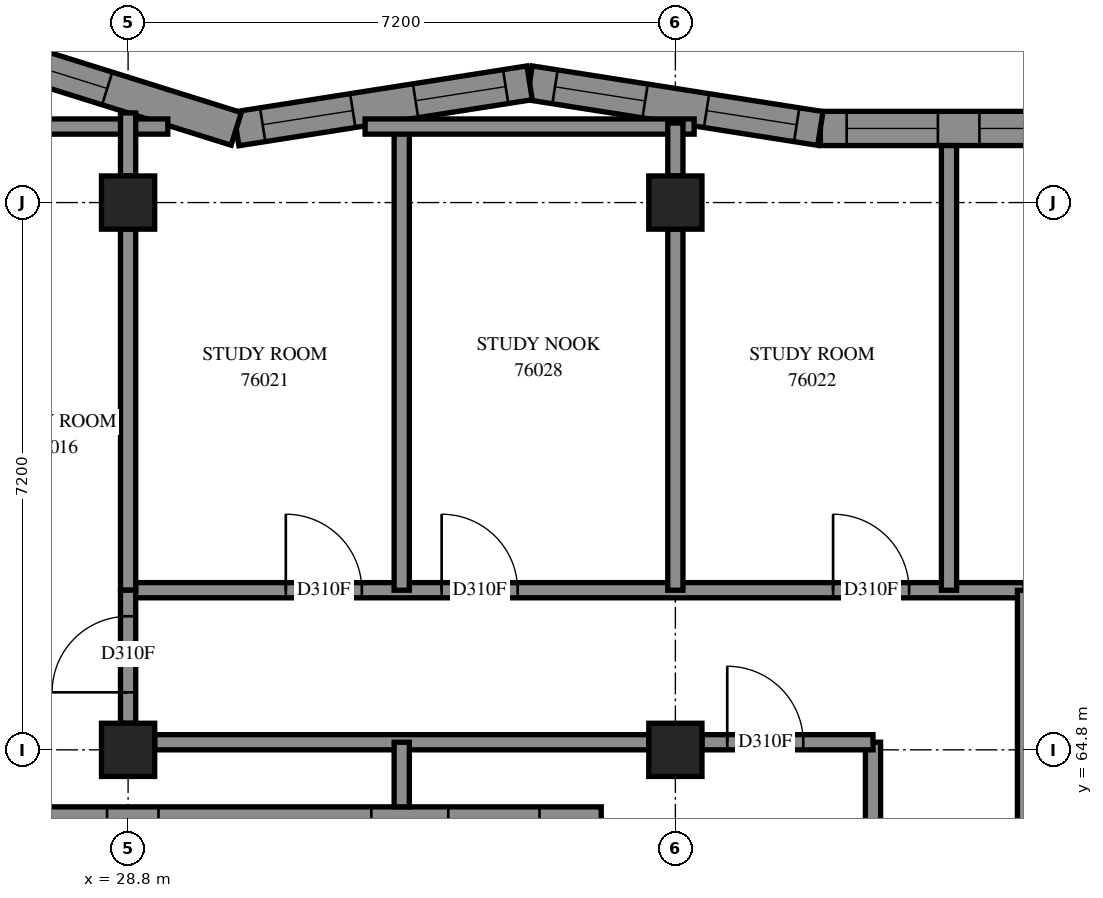
"""IFC4 building model, lengths in metres.
Left out: names, types, materials, properties, quantities, classifications, styles, units other than length and angle.
Written with IfcOpenShell. Run it as: python <this file> out.ifc"""

import sys

from ifc_helpers import new_model, si_unit, direction, frame, frame_2d, origin, origin_2d, place, context, subcontext, project, spatial, polyline, rectangle, outline, extrude, element, fill, save


model = new_model("IFC4")
c1 = context("Model", 3, precision=1e-05, world=origin(), true_north=direction((0.0, 1.0)))
c2 = subcontext(c1, "Body", "Model", "MODEL_VIEW")
j1 = project(units=[si_unit("LENGTHUNIT", "METRE"), si_unit("PLANEANGLEUNIT", "RADIAN")], contexts=[c1])
p1 = place(None, origin())
s1 = spatial("IfcSite", under=j1, at=p1, CompositionType="ELEMENT")
p2 = place(p1, origin())
s2 = spatial("IfcBuilding", under=s1, at=p2, CompositionType="ELEMENT")
p3 = place(p2, frame((0.0, 0.0, 277.8)))
s3 = spatial("IfcBuildingStorey", under=s2, at=p3, CompositionType="ELEMENT", Elevation=277.8)
for number, where, z_axis, x_axis in (
    (1, (28.8, 64.8, 0.0), (0.0, 0.0, 1.0), (1.0, 0.0, 0.0)),
    (2, (28.8, 72.0, 0.0), (0.0, 0.0, 1.0), (1.0, 0.0, 0.0)),
    (3, (36.0, 64.8, 0.0), (0.0, 0.0, 1.0), (1.0, 0.0, 0.0)),
    (4, (36.0, 72.0, 0.0), (0.0, 0.0, 1.0), (1.0, 0.0, 0.0)),
):
    element("IfcColumn", number, at=place(p3, frame(where, z_axis=z_axis, x_axis=x_axis)), inside=s3, PredefinedType="COLUMN", context=c2, shape_type="SweptSolid", body=[
        extrude(rectangle(XDim=0.7, YDim=0.7, at=origin_2d()), origin(), (0.0, 0.0, 1.0), 3.1),
    ])
p4 = place(p3, frame((45.611, 72.975, 0.0), z_axis=(0.0, 0.0, 1.0), x_axis=(-1.0, 0.0, 0.0)))
e5 = element("IfcWall", 5, at=p4, inside=s3, PredefinedType="SOLIDWALL", context=c2, shape_type="SweptSolid", body=[
    extrude(outline(polyline([(0.0, -0.225), (7.686, -0.225), (7.721, 0.225), (0.0, 0.225), (0.0, -0.225)])), origin(), (0.0, 0.0, 1.0), 3.1),
])
p5 = place(p4, frame((2.811, 0.0, 0.45)))
e6 = element("IfcOpeningElement", 6, at=p5, cuts=e5, PredefinedType="OPENING", context=c2, shape_type="SweptSolid", body=[
    extrude(rectangle(XDim=2.8, YDim=2.55, at=frame_2d((1.4, 1.275))), frame((0.0, 0.235, 0.0), z_axis=(0.0, -1.0, 0.0), x_axis=(1.0, 0.0, 0.0)), (0.0, 0.0, 1.0), 0.47),
])
p6 = place(p4, frame((0.705, 0.0, 0.45)))
e7 = element("IfcOpeningElement", 7, at=p6, cuts=e5, PredefinedType="OPENING", context=c2, shape_type="SweptSolid", body=[
    extrude(rectangle(XDim=1.2, YDim=2.55, at=frame_2d((0.6, 1.275))), frame((0.0, 0.235, 0.0), z_axis=(0.0, -1.0, 0.0), x_axis=(1.0, 0.0, 0.0)), (0.0, 0.0, 1.0), 0.47),
])
p7 = place(p4, frame((6.157, 0.0, 0.45)))
e8 = element("IfcOpeningElement", 8, at=p7, cuts=e5, PredefinedType="OPENING", context=c2, shape_type="SweptSolid", body=[
    extrude(rectangle(XDim=1.2, YDim=2.55, at=frame_2d((0.6, 1.275))), frame((0.0, 0.235, 0.0), z_axis=(0.0, -1.0, 0.0), x_axis=(1.0, 0.0, 0.0)), (0.0, 0.0, 1.0), 0.47),
])
p8 = place(p3, frame((37.908, 72.975, 0.0), z_axis=(0.0, 0.0, 1.0), x_axis=(-0.9879128581, 0.1550102733, 0.0)))
e9 = element("IfcWall", 9, at=p8, inside=s3, PredefinedType="SOLIDWALL", context=c2, shape_type="SweptSolid", body=[
    extrude(outline(polyline([(0.018, -0.225), (3.907, -0.225), (3.837, 0.225), (-0.018, 0.225), (0.018, -0.225)])), origin(), (0.0, 0.0, 1.0), 3.1),
])
p9 = place(p8, frame((0.316, 0.0, 0.45)))
e10 = element("IfcOpeningElement", 10, at=p9, cuts=e9, PredefinedType="OPENING", context=c2, shape_type="SweptSolid", body=[
    extrude(rectangle(XDim=1.2, YDim=2.55, at=frame_2d((0.6, 1.275))), frame((0.0, 0.235, 0.0), z_axis=(0.0, -1.0, 0.0), x_axis=(1.0, 0.0, 0.0)), (0.0, 0.0, 1.0), 0.47),
])
p10 = place(p8, frame((2.334, 0.0, 0.45)))
e11 = element("IfcOpeningElement", 11, at=p10, cuts=e9, PredefinedType="OPENING", context=c2, shape_type="SweptSolid", body=[
    extrude(rectangle(XDim=1.2, YDim=2.55, at=frame_2d((0.6, 1.275))), frame((0.0, 0.235, 0.0), z_axis=(0.0, -1.0, 0.0), x_axis=(1.0, 0.0, 0.0)), (0.0, 0.0, 1.0), 0.47),
])
p11 = place(p3, frame((34.083, 73.575, 0.0), z_axis=(0.0, 0.0, 1.0), x_axis=(-0.9879139938, -0.155003035, 0.0)))
e12 = element("IfcWall", 12, at=p11, inside=s3, PredefinedType="SOLIDWALL", context=c2, shape_type="SweptSolid", body=[
    extrude(outline(polyline([(-0.035, -0.225), (3.854, -0.225), (3.96, 0.225), (0.035, 0.225), (-0.035, -0.225)])), origin(), (0.0, 0.0, 1.0), 3.1),
])
p12 = place(p11, frame((0.319, 0.0, 0.45)))
e13 = element("IfcOpeningElement", 13, at=p12, cuts=e12, PredefinedType="OPENING", context=c2, shape_type="SweptSolid", body=[
    extrude(rectangle(XDim=1.2, YDim=2.55, at=frame_2d((0.6, 1.275))), frame((0.0, 0.235, 0.0), z_axis=(0.0, -1.0, 0.0), x_axis=(1.0, 0.0, 0.0)), (0.0, 0.0, 1.0), 0.47),
])
p13 = place(p11, frame((2.355, 0.0, 0.45)))
e14 = element("IfcOpeningElement", 14, at=p13, cuts=e12, PredefinedType="OPENING", context=c2, shape_type="SweptSolid", body=[
    extrude(rectangle(XDim=1.2, YDim=2.55, at=frame_2d((0.6, 1.275))), frame((0.0, 0.235, 0.0), z_axis=(0.0, -1.0, 0.0), x_axis=(1.0, 0.0, 0.0)), (0.0, 0.0, 1.0), 0.47),
])
p14 = place(p3, frame((30.223, 72.97, 0.0), z_axis=(0.0, 0.0, 1.0), x_axis=(-0.9543303604, 0.2987533486, 0.0)))
e15 = element("IfcWall", 15, at=p14, inside=s3, PredefinedType="SOLIDWALL", context=c2, shape_type="SweptSolid", body=[
    extrude(outline(polyline([(0.053, -0.225), (4.079, -0.225), (3.467, 0.225), (-0.053, 0.225), (0.053, -0.225)])), origin(), (0.0, 0.0, 1.0), 3.1),
])
p15 = place(p14, frame((1.779, 0.0, 0.45)))
e16 = element("IfcOpeningElement", 16, at=p15, cuts=e15, PredefinedType="OPENING", context=c2, shape_type="SweptSolid", body=[
    extrude(rectangle(XDim=1.2, YDim=2.55, at=frame_2d((0.6, 1.275))), frame((0.0, 0.235, 0.0), z_axis=(0.0, -1.0, 0.0), x_axis=(1.0, 0.0, 0.0)), (0.0, 0.0, 1.0), 0.47),
])
p16 = place(p3, frame((26.622, 63.825, 0.0), z_axis=(0.0, 0.0, 1.0), x_axis=(1.0, 0.0, 0.0)))
e17 = element("IfcWall", 17, at=p16, inside=s3, PredefinedType="SOLIDWALL", context=c2, shape_type="SweptSolid", body=[
    extrude(outline(polyline([(-0.225, -0.225), (8.178, -0.225), (8.628, 0.225), (0.225, 0.225), (-0.225, -0.225)])), origin(), (0.0, 0.0, 1.0), 3.1),
])
p17 = place(p16, frame((2.578, 0.0, 0.45)))
e18 = element("IfcOpeningElement", 18, at=p17, cuts=e17, PredefinedType="OPENING", context=c2, shape_type="SweptSolid", body=[
    extrude(rectangle(XDim=2.8, YDim=2.55, at=frame_2d((1.4, 1.275))), frame((0.0, 0.235, 0.0), z_axis=(0.0, -1.0, 0.0), x_axis=(1.0, 0.0, 0.0)), (0.0, 0.0, 1.0), 0.47),
])
p18 = place(p16, frame((0.702, 0.0, 0.45)))
e19 = element("IfcOpeningElement", 19, at=p18, cuts=e17, PredefinedType="OPENING", context=c2, shape_type="SweptSolid", body=[
    extrude(rectangle(XDim=1.2, YDim=2.55, at=frame_2d((0.6, 1.275))), frame((0.0, 0.235, 0.0), z_axis=(0.0, -1.0, 0.0), x_axis=(1.0, 0.0, 0.0)), (0.0, 0.0, 1.0), 0.47),
])
p19 = place(p16, frame((6.391, 0.0, 0.45)))
e20 = element("IfcOpeningElement", 20, at=p19, cuts=e17, PredefinedType="OPENING", context=c2, shape_type="SweptSolid", body=[
    extrude(rectangle(XDim=1.2, YDim=2.55, at=frame_2d((0.6, 1.275))), frame((0.0, 0.235, 0.0), z_axis=(0.0, -1.0, 0.0), x_axis=(1.0, 0.0, 0.0)), (0.0, 0.0, 1.0), 0.47),
])
p20 = place(p3, frame((35.025, 63.825, 0.0), z_axis=(0.0, 0.0, 1.0), x_axis=(0.0, -1.0, 0.0)))
e21 = element("IfcWall", 21, at=p20, inside=s3, PredefinedType="SOLIDWALL", context=c2, shape_type="SweptSolid", body=[
    extrude(outline(polyline([(0.225, -0.225), (7.425, -0.225), (6.975, 0.225), (-0.225, 0.225), (0.225, -0.225)])), origin(), (0.0, 0.0, 1.0), 3.1),
])
p21 = place(p20, frame((0.312, 0.0, 0.45)))
e22 = element("IfcOpeningElement", 22, at=p21, cuts=e21, PredefinedType="OPENING", context=c2, shape_type="SweptSolid", body=[
    extrude(rectangle(XDim=1.2, YDim=2.55, at=frame_2d((0.6, 1.275))), frame((0.0, 0.235, 0.0), z_axis=(0.0, -1.0, 0.0), x_axis=(1.0, 0.0, 0.0)), (0.0, 0.0, 1.0), 0.47),
])
p22 = place(p20, frame((3.875, 0.0, 0.7)))
e23 = element("IfcOpeningElement", 23, at=p22, cuts=e21, PredefinedType="OPENING", context=c2, shape_type="SweptSolid", body=[
    extrude(rectangle(XDim=1.8, YDim=2.3, at=frame_2d((0.9, 1.15))), frame((0.0, 0.235, 0.0), z_axis=(0.0, -1.0, 0.0), x_axis=(1.0, 0.0, 0.0)), (0.0, 0.0, 1.0), 0.47),
])
p23 = place(p3, frame((28.8, 66.9, 0.0), z_axis=(0.0, 0.0, 1.0), x_axis=(1.0, 0.0, 0.0)))
e24 = element("IfcWall", 24, at=p23, inside=s3, PredefinedType="PARTITIONING", context=c2, shape_type="SweptSolid", body=[
    extrude(rectangle(XDim=11.8, YDim=0.2, at=frame_2d((5.9, 0.0))), origin(), (0.0, 0.0, 1.0), 3.1),
])
p24 = place(p23, frame((2.075, 0.0, 0.0)))
e25 = element("IfcOpeningElement", 25, at=p24, cuts=e24, PredefinedType="OPENING", context=c2, shape_type="SweptSolid", body=[
    extrude(rectangle(XDim=1.0, YDim=2.1, at=frame_2d((0.5, 1.05))), frame((0.0, 0.11, 0.0), z_axis=(0.0, -1.0, 0.0), x_axis=(1.0, 0.0, 0.0)), (0.0, 0.0, 1.0), 0.22),
])
p25 = place(p23, frame((9.275, 0.0, 0.0)))
e26 = element("IfcOpeningElement", 26, at=p25, cuts=e24, PredefinedType="OPENING", context=c2, shape_type="SweptSolid", body=[
    extrude(rectangle(XDim=1.0, YDim=2.1, at=frame_2d((0.5, 1.05))), frame((0.0, 0.11, 0.0), z_axis=(0.0, -1.0, 0.0), x_axis=(1.0, 0.0, 0.0)), (0.0, 0.0, 1.0), 0.22),
])
p26 = place(p23, frame((4.125, 0.0, 0.0)))
e27 = element("IfcOpeningElement", 27, at=p26, cuts=e24, PredefinedType="OPENING", context=c2, shape_type="SweptSolid", body=[
    extrude(rectangle(XDim=1.0, YDim=2.1, at=frame_2d((0.5, 1.05))), frame((0.0, 0.11, 0.0), z_axis=(0.0, -1.0, 0.0), x_axis=(1.0, 0.0, 0.0)), (0.0, 0.0, 1.0), 0.22),
])
p27 = place(p3, frame((29.15, 64.9, 0.0), z_axis=(0.0, 0.0, 1.0), x_axis=(1.0, 0.0, 0.0)))
e28 = element("IfcWall", 28, at=p27, inside=s3, PredefinedType="PARTITIONING", context=c2, shape_type="SweptSolid", body=[
    extrude(rectangle(XDim=6.5, YDim=0.2, at=frame_2d((3.25, 0.0))), origin(), (0.0, 0.0, 1.0), 2.6),
])
p28 = place(p3, frame((32.4, 66.9, 0.0), z_axis=(0.0, 0.0, 1.0), x_axis=(0.0, 1.0, 0.0)))
e29 = element("IfcWall", 29, at=p28, inside=s3, PredefinedType="PARTITIONING", context=c2, shape_type="SweptSolid", body=[
    extrude(rectangle(XDim=6.184, YDim=0.2, at=frame_2d((3.092, 0.0))), origin(), (0.0, 0.0, 1.0), 3.1),
])
p29 = place(p3, frame((39.6, 66.9, 0.0), z_axis=(0.0, 0.0, 1.0), x_axis=(0.0, 1.0, 0.0)))
e30 = element("IfcWall", 30, at=p29, inside=s3, PredefinedType="PARTITIONING", context=c2, shape_type="SweptSolid", body=[
    extrude(rectangle(XDim=5.85, YDim=0.2, at=frame_2d((2.925, 0.0))), origin(), (0.0, 0.0, 1.0), 3.1),
])
p30 = place(p3, frame((28.8, 66.9, 0.0), z_axis=(0.0, 0.0, 1.0), x_axis=(0.0, 1.0, 0.0)))
e31 = element("IfcWall", 31, at=p30, inside=s3, PredefinedType="PARTITIONING", context=c2, shape_type="SweptSolid", body=[
    extrude(rectangle(XDim=4.75, YDim=0.2, at=frame_2d((2.375, 0.0))), origin(), (0.0, 0.0, 1.0), 2.6),
])
p31 = place(p3, frame((36.0, 66.9, 0.0), z_axis=(0.0, 0.0, 1.0), x_axis=(0.0, 1.0, 0.0)))
e32 = element("IfcWall", 32, at=p31, inside=s3, PredefinedType="PARTITIONING", context=c2, shape_type="SweptSolid", body=[
    extrude(rectangle(XDim=4.75, YDim=0.2, at=frame_2d((2.375, 0.0))), origin(), (0.0, 0.0, 1.0), 3.1),
])
p32 = place(p3, frame((40.6, 62.202, 0.0), z_axis=(0.0, 0.0, 1.0), x_axis=(0.0, 1.0, 0.0)))
e33 = element("IfcWall", 33, at=p32, inside=s3, PredefinedType="PARTITIONING", context=c2, shape_type="SweptSolid", body=[
    extrude(rectangle(XDim=4.696, YDim=0.2, at=frame_2d((2.348, 0.0))), origin(), (0.0, 0.0, 1.0), 3.1),
])
p33 = place(p3, frame((31.918, 73.0, 0.0), z_axis=(0.0, 0.0, 1.0), x_axis=(1.0, 0.0, 0.0)))
e34 = element("IfcWall", 34, at=p33, inside=s3, PredefinedType="PARTITIONING", context=c2, shape_type="SweptSolid", body=[
    extrude(rectangle(XDim=4.329, YDim=0.2, at=frame_2d((2.164, 0.0))), origin(), (0.0, 0.0, 1.0), 3.1),
])
p34 = place(p3, frame((38.6, 62.202, 0.0), z_axis=(0.0, 0.0, 1.0), x_axis=(0.0, 1.0, 0.0)))
e35 = element("IfcWall", 35, at=p34, inside=s3, PredefinedType="PARTITIONING", context=c2, shape_type="SweptSolid", body=[
    extrude(rectangle(XDim=2.698, YDim=0.2, at=frame_2d((1.349, 0.0))), origin(), (0.0, 0.0, 1.0), 3.1),
])
p35 = place(p3, frame((26.847, 73.0, 0.0), z_axis=(0.0, 0.0, 1.0), x_axis=(1.0, 0.0, 0.0)))
e36 = element("IfcWall", 36, at=p35, inside=s3, PredefinedType="PARTITIONING", context=c2, shape_type="SweptSolid", body=[
    extrude(rectangle(XDim=2.475, YDim=0.2, at=frame_2d((1.238, 0.0))), origin(), (0.0, 0.0, 1.0), 3.1),
])
p36 = place(p3, frame((36.35, 64.9, 0.0), z_axis=(0.0, 0.0, 1.0), x_axis=(1.0, 0.0, 0.0)))
e37 = element("IfcWall", 37, at=p36, inside=s3, PredefinedType="PARTITIONING", context=c2, shape_type="SweptSolid", body=[
    extrude(rectangle(XDim=2.25, YDim=0.2, at=frame_2d((1.125, 0.0))), origin(), (0.0, 0.0, 1.0), 3.1),
])
p37 = place(p36, frame((0.333, 0.0, 0.0)))
e38 = element("IfcOpeningElement", 38, at=p37, cuts=e37, PredefinedType="OPENING", context=c2, shape_type="SweptSolid", body=[
    extrude(rectangle(XDim=1.0, YDim=2.1, at=frame_2d((0.5, 1.05))), frame((0.0, 0.11, 0.0), z_axis=(0.0, -1.0, 0.0), x_axis=(1.0, 0.0, 0.0)), (0.0, 0.0, 1.0), 0.22),
])
p38 = place(p3, frame((28.8, 65.15, 0.0), z_axis=(0.0, 0.0, 1.0), x_axis=(0.0, 1.0, 0.0)))
e39 = element("IfcWall", 39, at=p38, inside=s3, PredefinedType="PARTITIONING", context=c2, shape_type="SweptSolid", body=[
    extrude(rectangle(XDim=1.75, YDim=0.2, at=frame_2d((0.875, 0.0))), origin(), (0.0, 0.0, 1.0), 2.6),
])
p39 = place(p38, frame((0.407, 0.0, 0.0)))
e40 = element("IfcOpeningElement", 40, at=p39, cuts=e39, PredefinedType="OPENING", context=c2, shape_type="SweptSolid", body=[
    extrude(rectangle(XDim=1.0, YDim=2.1, at=frame_2d((0.5, 1.05))), frame((0.0, 0.11, 0.0), z_axis=(0.0, -1.0, 0.0), x_axis=(1.0, 0.0, 0.0)), (0.0, 0.0, 1.0), 0.22),
])
p40 = place(p3, frame((32.4, 64.05, 0.0), z_axis=(0.0, 0.0, 1.0), x_axis=(0.0, 1.0, 0.0)))
e41 = element("IfcWall", 41, at=p40, inside=s3, PredefinedType="PARTITIONING", context=c2, shape_type="SweptSolid", body=[
    extrude(rectangle(XDim=0.85, YDim=0.2, at=frame_2d((0.425, 0.0))), origin(), (0.0, 0.0, 1.0), 3.1),
])
p41 = place(p3, frame((28.8, 72.35, 0.0), z_axis=(0.0, 0.0, 1.0), x_axis=(0.0, 1.0, 0.0)))
e42 = element("IfcWall", 42, at=p41, inside=s3, PredefinedType="PARTITIONING", context=c2, shape_type="SweptSolid", body=[
    extrude(rectangle(XDim=0.829, YDim=0.2, at=frame_2d((0.415, 0.0))), origin(), (0.0, 0.0, 1.0), 3.1),
])
p42 = place(p3, frame((36.0, 72.35, 0.0), z_axis=(0.0, 0.0, 1.0), x_axis=(0.0, 1.0, 0.0)))
e43 = element("IfcWall", 43, at=p42, inside=s3, PredefinedType="PARTITIONING", context=c2, shape_type="SweptSolid", body=[
    extrude(rectangle(XDim=0.697, YDim=0.2, at=frame_2d((0.348, 0.0))), origin(), (0.0, 0.0, 1.0), 3.1),
])
p43 = place(p5, origin())
e44 = element("IfcWindow", 44, at=p43, inside=s3, PartitioningType="SINGLE_PANEL", PredefinedType="WINDOW", context=c2, shape_type="SweptSolid", body=[
    extrude(rectangle(XDim=2.8, YDim=2.55, at=frame_2d((1.4, 1.275))), frame((0.0, 0.205, 0.0), z_axis=(0.0, -1.0, 0.0), x_axis=(1.0, 0.0, 0.0)), (0.0, 0.0, 1.0), 0.06),
])
fill(e6, e44)
p44 = place(p7, origin())
e45 = element("IfcWindow", 45, at=p44, inside=s3, PartitioningType="SINGLE_PANEL", PredefinedType="WINDOW", context=c2, shape_type="SweptSolid", body=[
    extrude(rectangle(XDim=1.2, YDim=2.55, at=frame_2d((0.6, 1.275))), frame((0.0, 0.205, 0.0), z_axis=(0.0, -1.0, 0.0), x_axis=(1.0, 0.0, 0.0)), (0.0, 0.0, 1.0), 0.06),
])
fill(e8, e45)
p45 = place(p9, origin())
e46 = element("IfcWindow", 46, at=p45, inside=s3, PartitioningType="SINGLE_PANEL", PredefinedType="WINDOW", context=c2, shape_type="SweptSolid", body=[
    extrude(rectangle(XDim=1.2, YDim=2.55, at=frame_2d((0.6, 1.275))), frame((0.0, 0.205, 0.0), z_axis=(0.0, -1.0, 0.0), x_axis=(1.0, 0.0, 0.0)), (0.0, 0.0, 1.0), 0.06),
])
fill(e10, e46)
p46 = place(p10, origin())
e47 = element("IfcWindow", 47, at=p46, inside=s3, PartitioningType="SINGLE_PANEL", PredefinedType="WINDOW", context=c2, shape_type="SweptSolid", body=[
    extrude(rectangle(XDim=1.2, YDim=2.55, at=frame_2d((0.6, 1.275))), frame((0.0, 0.205, 0.0), z_axis=(0.0, -1.0, 0.0), x_axis=(1.0, 0.0, 0.0)), (0.0, 0.0, 1.0), 0.06),
])
fill(e11, e47)
p47 = place(p12, origin())
e48 = element("IfcWindow", 48, at=p47, inside=s3, PartitioningType="SINGLE_PANEL", PredefinedType="WINDOW", context=c2, shape_type="SweptSolid", body=[
    extrude(rectangle(XDim=1.2, YDim=2.55, at=frame_2d((0.6, 1.275))), frame((0.0, 0.205, 0.0), z_axis=(0.0, -1.0, 0.0), x_axis=(1.0, 0.0, 0.0)), (0.0, 0.0, 1.0), 0.06),
])
fill(e13, e48)
p48 = place(p13, origin())
e49 = element("IfcWindow", 49, at=p48, inside=s3, PartitioningType="SINGLE_PANEL", PredefinedType="WINDOW", context=c2, shape_type="SweptSolid", body=[
    extrude(rectangle(XDim=1.2, YDim=2.55, at=frame_2d((0.6, 1.275))), frame((0.0, 0.205, 0.0), z_axis=(0.0, -1.0, 0.0), x_axis=(1.0, 0.0, 0.0)), (0.0, 0.0, 1.0), 0.06),
])
fill(e14, e49)
p49 = place(p15, origin())
e50 = element("IfcWindow", 50, at=p49, inside=s3, PartitioningType="SINGLE_PANEL", PredefinedType="WINDOW", context=c2, shape_type="SweptSolid", body=[
    extrude(rectangle(XDim=1.2, YDim=2.55, at=frame_2d((0.6, 1.275))), frame((0.0, 0.205, 0.0), z_axis=(0.0, -1.0, 0.0), x_axis=(1.0, 0.0, 0.0)), (0.0, 0.0, 1.0), 0.06),
])
fill(e16, e50)
p50 = place(p17, origin())
e51 = element("IfcWindow", 51, at=p50, inside=s3, PartitioningType="SINGLE_PANEL", PredefinedType="WINDOW", context=c2, shape_type="SweptSolid", body=[
    extrude(rectangle(XDim=2.8, YDim=2.55, at=frame_2d((1.4, 1.275))), frame((0.0, 0.205, 0.0), z_axis=(0.0, -1.0, 0.0), x_axis=(1.0, 0.0, 0.0)), (0.0, 0.0, 1.0), 0.06),
])
fill(e18, e51)
p51 = place(p18, origin())
e52 = element("IfcWindow", 52, at=p51, inside=s3, PartitioningType="SINGLE_PANEL", PredefinedType="WINDOW", context=c2, shape_type="SweptSolid", body=[
    extrude(rectangle(XDim=1.2, YDim=2.55, at=frame_2d((0.6, 1.275))), frame((0.0, 0.205, 0.0), z_axis=(0.0, -1.0, 0.0), x_axis=(1.0, 0.0, 0.0)), (0.0, 0.0, 1.0), 0.06),
])
fill(e19, e52)
p52 = place(p19, origin())
e53 = element("IfcWindow", 53, at=p52, inside=s3, PartitioningType="SINGLE_PANEL", PredefinedType="WINDOW", context=c2, shape_type="SweptSolid", body=[
    extrude(rectangle(XDim=1.2, YDim=2.55, at=frame_2d((0.6, 1.275))), frame((0.0, 0.205, 0.0), z_axis=(0.0, -1.0, 0.0), x_axis=(1.0, 0.0, 0.0)), (0.0, 0.0, 1.0), 0.06),
])
fill(e20, e53)
p53 = place(p39, origin())
e54 = element("IfcDoor", 54, at=p53, inside=s3, OperationType="SINGLE_SWING_LEFT", PredefinedType="DOOR", context=c2, shape_type="SweptSolid", body=[
    extrude(rectangle(XDim=1.0, YDim=2.1, at=frame_2d((0.5, 1.05))), frame((0.0, 0.025, 0.0), z_axis=(0.0, -1.0, 0.0), x_axis=(1.0, 0.0, 0.0)), (0.0, 0.0, 1.0), 0.05),
])
fill(e40, e54)
p54 = place(p24, origin())
e55 = element("IfcDoor", 55, at=p54, inside=s3, OperationType="SINGLE_SWING_RIGHT", PredefinedType="DOOR", context=c2, shape_type="SweptSolid", body=[
    extrude(rectangle(XDim=1.0, YDim=2.1, at=frame_2d((0.5, 1.05))), frame((0.0, 0.025, 0.0), z_axis=(0.0, -1.0, 0.0), x_axis=(1.0, 0.0, 0.0)), (0.0, 0.0, 1.0), 0.05),
])
fill(e25, e55)
p55 = place(p25, origin())
e56 = element("IfcDoor", 56, at=p55, inside=s3, OperationType="SINGLE_SWING_RIGHT", PredefinedType="DOOR", context=c2, shape_type="SweptSolid", body=[
    extrude(rectangle(XDim=1.0, YDim=2.1, at=frame_2d((0.5, 1.05))), frame((0.0, 0.025, 0.0), z_axis=(0.0, -1.0, 0.0), x_axis=(1.0, 0.0, 0.0)), (0.0, 0.0, 1.0), 0.05),
])
fill(e26, e56)
p56 = place(p37, origin())
e57 = element("IfcDoor", 57, at=p56, inside=s3, OperationType="SINGLE_SWING_RIGHT", PredefinedType="DOOR", context=c2, shape_type="SweptSolid", body=[
    extrude(rectangle(XDim=1.0, YDim=2.1, at=frame_2d((0.5, 1.05))), frame((0.0, 0.025, 0.0), z_axis=(0.0, -1.0, 0.0), x_axis=(1.0, 0.0, 0.0)), (0.0, 0.0, 1.0), 0.05),
])
fill(e38, e57)
p57 = place(p26, origin())
e58 = element("IfcDoor", 58, at=p57, inside=s3, OperationType="SINGLE_SWING_LEFT", PredefinedType="DOOR", context=c2, shape_type="SweptSolid", body=[
    extrude(rectangle(XDim=1.0, YDim=2.1, at=frame_2d((0.5, 1.05))), frame((0.0, 0.025, 0.0), z_axis=(0.0, -1.0, 0.0), x_axis=(1.0, 0.0, 0.0)), (0.0, 0.0, 1.0), 0.05),
])
fill(e27, e58)
save(model, sys.argv[1])
